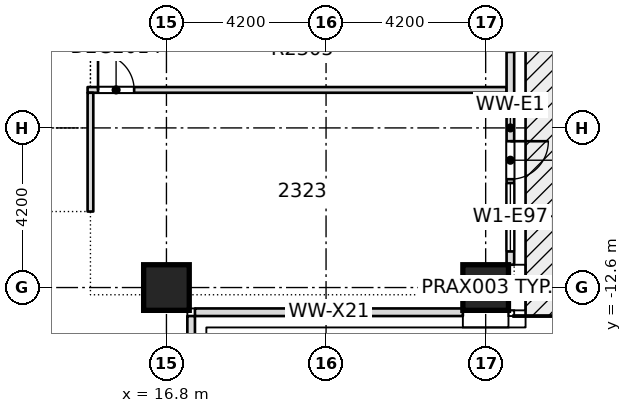
"""IFC4 building model, lengths in metres.
Left out: names, types, materials, properties, quantities, classifications, styles, units other than length and angle.
Written with IfcOpenShell. Run it as: python <this file> out.ifc"""

import sys

from ifc_helpers import new_model, si_unit, direction, frame, frame_2d, origin, origin_2d, place, context, subcontext, project, spatial, rectangle, extrude, element, fill, save


model = new_model("IFC4")
c1 = context("Model", 3, precision=1e-05, world=origin(), true_north=direction((0.0, 1.0)))
c2 = subcontext(c1, "Body", "Model", "MODEL_VIEW")
j1 = project(units=[si_unit("LENGTHUNIT", "METRE"), si_unit("PLANEANGLEUNIT", "RADIAN")], contexts=[c1])
p1 = place(None, origin())
s1 = spatial("IfcSite", under=j1, at=p1, CompositionType="ELEMENT")
p2 = place(p1, origin())
s2 = spatial("IfcBuilding", under=s1, at=p2, CompositionType="ELEMENT")
p3 = place(p2, frame((0.0, 0.0, 94.2)))
s3 = spatial("IfcBuildingStorey", under=s2, at=p3, CompositionType="ELEMENT", Elevation=94.2)
for number, where, z_axis, x_axis in (
    (1, (16.8, -12.6, -0.32), (0.0, 0.0, 1.0), (1.0, 0.0, 0.0)),
    (2, (25.2, -12.6, -0.32), (0.0, 0.0, 1.0), (1.0, 0.0, 0.0)),
):
    element("IfcColumn", number, at=place(p3, frame(where, z_axis=z_axis, x_axis=x_axis)), inside=s3, PredefinedType="COLUMN", context=c2, shape_type="SweptSolid", body=[
        extrude(rectangle(XDim=1.2, YDim=1.2, at=origin_2d()), origin(), (0.0, 0.0, 1.0), 3.45),
    ])
p4 = place(p3, frame((14.725, -7.4, 0.0), z_axis=(0.0, 0.0, 1.0), x_axis=(1.0, 0.0, 0.0)))
e3 = element("IfcWall", 3, at=p4, inside=s3, PredefinedType="PARTITIONING", context=c2, shape_type="SweptSolid", body=[
    extrude(rectangle(XDim=11.025, YDim=0.15, at=frame_2d((5.512, 0.0))), origin(), (0.0, 0.0, 1.0), 3.13),
])
p5 = place(p4, frame((0.275, 0.0, 0.0)))
e4 = element("IfcOpeningElement", 4, at=p5, cuts=e3, PredefinedType="OPENING", context=c2, shape_type="SweptSolid", body=[
    extrude(rectangle(XDim=0.95, YDim=2.1, at=frame_2d((0.475, 1.05))), frame((0.0, 0.085, 0.0), z_axis=(0.0, -1.0, 0.0), x_axis=(1.0, 0.0, 0.0)), (0.0, 0.0, 1.0), 0.17),
])
p6 = place(p3, frame((14.8, -10.6, 0.0), z_axis=(0.0, 0.0, 1.0), x_axis=(0.0, 1.0, 0.0)))
e5 = element("IfcWall", 5, at=p6, inside=s3, PredefinedType="PARTITIONING", context=c2, shape_type="SweptSolid", body=[
    extrude(rectangle(XDim=3.125, YDim=0.15, at=frame_2d((1.562, 0.0))), origin(), (0.0, 0.0, 1.0), 3.13),
])
p7 = place(p3, frame((17.45, -20.4, 0.0), z_axis=(0.0, 0.0, 1.0), x_axis=(0.0, 1.0, 0.0)))
e6 = element("IfcWall", 6, at=p7, inside=s3, PredefinedType="STANDARD", context=c2, shape_type="SweptSolid", body=[
    extrude(rectangle(XDim=7.05, YDim=0.2, at=frame_2d((3.525, 0.0))), origin(), (0.0, 0.0, 1.0), 3.13),
])
p8 = place(p7, frame((0.35, 0.0, 0.2)))
e7 = element("IfcOpeningElement", 7, at=p8, cuts=e6, PredefinedType="OPENING", context=c2, shape_type="SweptSolid", body=[
    extrude(rectangle(XDim=1.8, YDim=2.65, at=frame_2d((0.9, 1.325))), frame((0.0, 0.11, 0.0), z_axis=(0.0, -1.0, 0.0), x_axis=(1.0, 0.0, 0.0)), (0.0, 0.0, 1.0), 0.22),
])
p9 = place(p7, frame((3.875, 0.0, 0.2)))
e8 = element("IfcOpeningElement", 8, at=p9, cuts=e6, PredefinedType="OPENING", context=c2, shape_type="SweptSolid", body=[
    extrude(rectangle(XDim=1.8, YDim=2.65, at=frame_2d((0.9, 1.325))), frame((0.0, 0.11, 0.0), z_axis=(0.0, -1.0, 0.0), x_axis=(1.0, 0.0, 0.0)), (0.0, 0.0, 1.0), 0.22),
])
p10 = place(p3, frame((17.55, -13.25, 0.0), z_axis=(0.0, 0.0, 1.0), x_axis=(1.0, 0.0, 0.0)))
e9 = element("IfcWall", 9, at=p10, inside=s3, PredefinedType="STANDARD", context=c2, shape_type="SweptSolid", body=[
    extrude(rectangle(XDim=7.05, YDim=0.2, at=frame_2d((3.525, 0.0))), origin(), (0.0, 0.0, 1.0), 3.13),
])
p11 = place(p3, frame((25.85, -12.0, 0.0), z_axis=(0.0, 0.0, 1.0), x_axis=(0.0, 1.0, 0.0)))
e10 = element("IfcWall", 10, at=p11, inside=s3, PredefinedType="STANDARD", context=c2, shape_type="SweptSolid", body=[
    extrude(rectangle(XDim=7.2, YDim=0.2, at=frame_2d((3.6, 0.0))), origin(), (0.0, 0.0, 1.0), 3.13),
])
p12 = place(p11, frame((0.35, 0.0, 0.2)))
e11 = element("IfcOpeningElement", 11, at=p12, cuts=e10, PredefinedType="OPENING", context=c2, shape_type="SweptSolid", body=[
    extrude(rectangle(XDim=1.8, YDim=2.65, at=frame_2d((0.9, 1.325))), frame((0.0, 0.11, 0.0), z_axis=(0.0, -1.0, 0.0), x_axis=(1.0, 0.0, 0.0)), (0.0, 0.0, 1.0), 0.22),
])
p13 = place(p11, frame((2.25, 0.0, 0.0)))
e12 = element("IfcOpeningElement", 12, at=p13, cuts=e10, PredefinedType="OPENING", context=c2, shape_type="SweptSolid", body=[
    extrude(rectangle(XDim=1.0, YDim=2.4, at=frame_2d((0.5, 1.2))), frame((0.0, 0.11, 0.0), z_axis=(0.0, -1.0, 0.0), x_axis=(1.0, 0.0, 0.0)), (0.0, 0.0, 1.0), 0.22),
])
p14 = place(p11, frame((5.6, 0.0, 0.0)))
e13 = element("IfcOpeningElement", 13, at=p14, cuts=e10, PredefinedType="OPENING", context=c2, shape_type="SweptSolid", body=[
    extrude(rectangle(XDim=1.0, YDim=2.4, at=frame_2d((0.5, 1.2))), frame((0.0, 0.11, 0.0), z_axis=(0.0, -1.0, 0.0), x_axis=(1.0, 0.0, 0.0)), (0.0, 0.0, 1.0), 0.22),
])
p15 = place(p5, origin())
e14 = element("IfcDoor", 14, at=p15, inside=s3, OperationType="SINGLE_SWING_RIGHT", PredefinedType="DOOR", context=c2, shape_type="SweptSolid", body=[
    extrude(rectangle(XDim=0.95, YDim=2.1, at=frame_2d((0.475, 1.05))), frame((0.0, 0.025, 0.0), z_axis=(0.0, -1.0, 0.0), x_axis=(1.0, 0.0, 0.0)), (0.0, 0.0, 1.0), 0.05),
])
fill(e4, e14)
p16 = place(p12, origin())
e15 = element("IfcWindow", 15, at=p16, inside=s3, PartitioningType="SINGLE_PANEL", PredefinedType="WINDOW", context=c2, shape_type="SweptSolid", body=[
    extrude(rectangle(XDim=1.8, YDim=2.65, at=frame_2d((0.9, 1.325))), frame((0.0, 0.03, 0.0), z_axis=(0.0, -1.0, 0.0), x_axis=(1.0, 0.0, 0.0)), (0.0, 0.0, 1.0), 0.06),
])
fill(e11, e15)
p17 = place(p13, origin())
e16 = element("IfcDoor", 16, at=p17, inside=s3, OperationType="SINGLE_SWING_LEFT", PredefinedType="DOOR", context=c2, shape_type="SweptSolid", body=[
    extrude(rectangle(XDim=1.0, YDim=2.4, at=frame_2d((0.5, 1.2))), frame((0.0, 0.025, 0.0), z_axis=(0.0, -1.0, 0.0), x_axis=(1.0, 0.0, 0.0)), (0.0, 0.0, 1.0), 0.05),
])
fill(e12, e16)
save(model, sys.argv[1])
